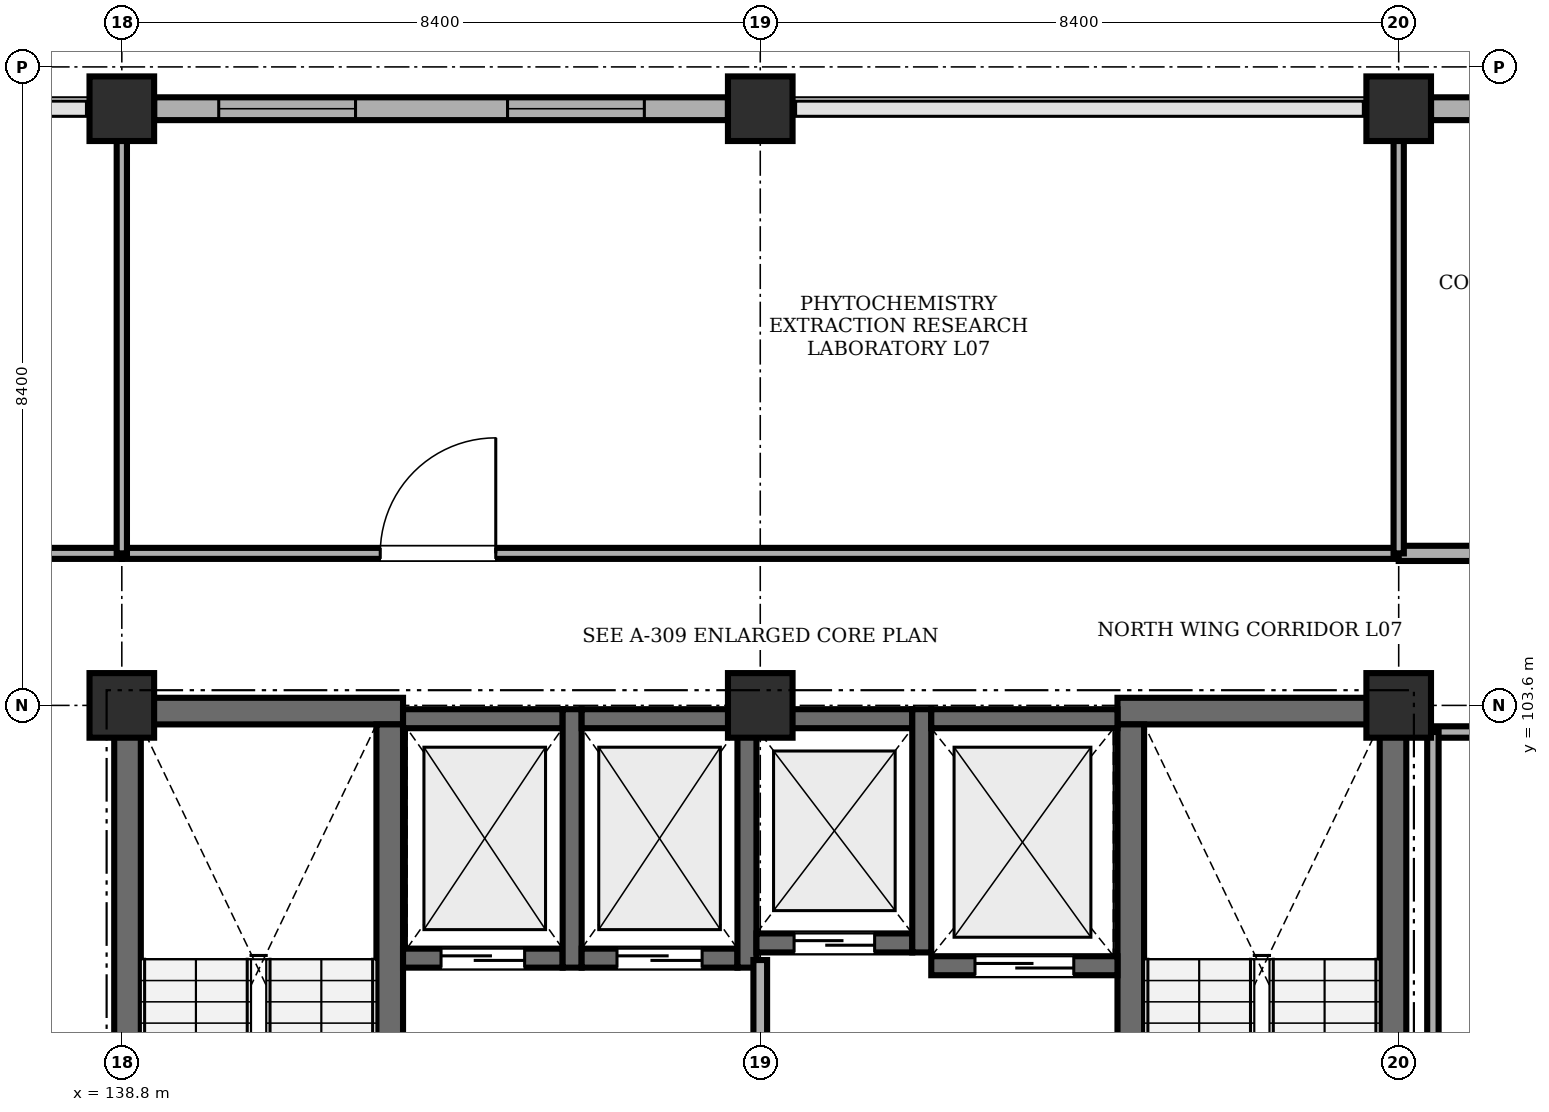
"""IFC4 building model, lengths in metres.
Left out: names, types, materials, properties, quantities, classifications, styles, units other than length and angle.
Written with IfcOpenShell. Run it as: python <this file> out.ifc"""

import sys

from ifc_helpers import new_model, si_unit, direction, frame, frame_2d, origin, origin_2d, place, context, subcontext, project, spatial, rectangle, extrude, element, fill, save


model = new_model("IFC4")
c1 = context("Model", 3, precision=1e-05, world=origin(), true_north=direction((0.0, 1.0)))
c2 = subcontext(c1, "Body", "Model", "MODEL_VIEW")
j1 = project(units=[si_unit("LENGTHUNIT", "METRE"), si_unit("PLANEANGLEUNIT", "RADIAN")], contexts=[c1])
p1 = place(None, origin())
s1 = spatial("IfcSite", under=j1, at=p1, CompositionType="ELEMENT")
p2 = place(p1, origin())
s2 = spatial("IfcBuilding", under=s1, at=p2, CompositionType="ELEMENT")
p3 = place(p2, frame((0.0, 0.0, 27.6)))
s3 = spatial("IfcBuildingStorey", under=s2, at=p3, CompositionType="ELEMENT", Elevation=27.6)
for number, where, z_axis, x_axis in (
    (1, (138.8, 103.6, 0.0), (0.0, 0.0, 1.0), (1.0, 0.0, 0.0)),
    (2, (138.8, 111.45, 0.0), (0.0, 0.0, 1.0), (1.0, 0.0, 0.0)),
    (3, (147.2, 103.6, 0.0), (0.0, 0.0, 1.0), (1.0, 0.0, 0.0)),
    (4, (147.2, 111.45, 0.0), (0.0, 0.0, 1.0), (1.0, 0.0, 0.0)),
    (5, (155.6, 103.6, 0.0), (0.0, 0.0, 1.0), (1.0, 0.0, 0.0)),
    (6, (155.6, 111.45, 0.0), (0.0, 0.0, 1.0), (1.0, 0.0, 0.0)),
):
    element("IfcColumn", number, at=place(p3, frame(where, z_axis=z_axis, x_axis=x_axis)), inside=s3, PredefinedType="COLUMN", context=c2, shape_type="SweptSolid", body=[
        extrude(rectangle(XDim=0.85, YDim=0.85, at=origin_2d()), origin(), (0.0, 0.0, 1.0), 4.02),
    ])
p4 = place(p3, frame((138.7, 103.525, 0.0), z_axis=(0.0, 0.0, 1.0), x_axis=(1.0, 0.0, 0.0)))
e7 = element("IfcWall", 7, at=p4, inside=s3, PredefinedType="SHEAR", context=c2, shape_type="SweptSolid", body=[
    extrude(rectangle(XDim=3.8, YDim=0.35, at=frame_2d((1.9, 0.0))), origin(), (0.0, 0.0, 1.0), 4.02),
])
p5 = place(p3, frame((138.875, 95.45, 0.0), z_axis=(0.0, 0.0, 1.0), x_axis=(0.0, 1.0, 0.0)))
e8 = element("IfcWall", 8, at=p5, inside=s3, PredefinedType="SHEAR", context=c2, shape_type="SweptSolid", body=[
    extrude(rectangle(XDim=7.9, YDim=0.35, at=frame_2d((3.95, 0.0))), origin(), (0.0, 0.0, 1.0), 4.02),
])
p6 = place(p3, frame((142.325, 95.45, 0.0), z_axis=(0.0, 0.0, 1.0), x_axis=(0.0, 1.0, 0.0)))
e9 = element("IfcWall", 9, at=p6, inside=s3, PredefinedType="SHEAR", context=c2, shape_type="SweptSolid", body=[
    extrude(rectangle(XDim=7.9, YDim=0.35, at=frame_2d((3.95, 0.0))), origin(), (0.0, 0.0, 1.0), 4.02),
])
p7 = place(p6, frame((0.22, 0.0, 0.0)))
e10 = element("IfcOpeningElement", 10, at=p7, cuts=e9, PredefinedType="OPENING", context=c2, shape_type="SweptSolid", body=[
    extrude(rectangle(XDim=1.15, YDim=2.15, at=frame_2d((0.575, 1.075))), frame((0.0, 0.185, 0.0), z_axis=(0.0, -1.0, 0.0), x_axis=(1.0, 0.0, 0.0)), (0.0, 0.0, 1.0), 0.37),
])
p8 = place(p3, frame((151.9, 103.525, 0.0), z_axis=(0.0, 0.0, 1.0), x_axis=(1.0, 0.0, 0.0)))
e11 = element("IfcWall", 11, at=p8, inside=s3, PredefinedType="SHEAR", context=c2, shape_type="SweptSolid", body=[
    extrude(rectangle(XDim=3.8, YDim=0.35, at=frame_2d((1.9, 0.0))), origin(), (0.0, 0.0, 1.0), 4.02),
])
p9 = place(p3, frame((152.075, 95.45, 0.0), z_axis=(0.0, 0.0, 1.0), x_axis=(0.0, 1.0, 0.0)))
e12 = element("IfcWall", 12, at=p9, inside=s3, PredefinedType="SHEAR", context=c2, shape_type="SweptSolid", body=[
    extrude(rectangle(XDim=7.9, YDim=0.35, at=frame_2d((3.95, 0.0))), origin(), (0.0, 0.0, 1.0), 4.02),
])
p10 = place(p9, frame((0.35, 0.0, 0.0)))
e13 = element("IfcOpeningElement", 13, at=p10, cuts=e12, PredefinedType="OPENING", context=c2, shape_type="SweptSolid", body=[
    extrude(rectangle(XDim=1.15, YDim=2.15, at=frame_2d((0.575, 1.075))), frame((0.0, 0.185, 0.0), z_axis=(0.0, -1.0, 0.0), x_axis=(1.0, 0.0, 0.0)), (0.0, 0.0, 1.0), 0.37),
])
p11 = place(p3, frame((155.525, 95.45, 0.0), z_axis=(0.0, 0.0, 1.0), x_axis=(0.0, 1.0, 0.0)))
e14 = element("IfcWall", 14, at=p11, inside=s3, PredefinedType="SHEAR", context=c2, shape_type="SweptSolid", body=[
    extrude(rectangle(XDim=7.9, YDim=0.35, at=frame_2d((3.95, 0.0))), origin(), (0.0, 0.0, 1.0), 4.02),
])
p12 = place(p3, frame((142.5, 100.275, 0.0), z_axis=(0.0, 0.0, 1.0), x_axis=(1.0, 0.0, 0.0)))
e15 = element("IfcWall", 15, at=p12, inside=s3, PredefinedType="SHEAR", context=c2, shape_type="SweptSolid", body=[
    extrude(rectangle(XDim=2.1, YDim=0.25, at=frame_2d((1.05, 0.0))), origin(), (0.0, 0.0, 1.0), 4.02),
])
p13 = place(p12, frame((0.5, 0.0, 0.0)))
e16 = element("IfcOpeningElement", 16, at=p13, cuts=e15, PredefinedType="OPENING", context=c2, shape_type="SweptSolid", body=[
    extrude(rectangle(XDim=1.1, YDim=2.15, at=frame_2d((0.55, 1.075))), frame((0.0, 0.135, 0.0), z_axis=(0.0, -1.0, 0.0), x_axis=(1.0, 0.0, 0.0)), (0.0, 0.0, 1.0), 0.27),
])
p14 = place(p3, frame((142.5, 103.425, 0.0), z_axis=(0.0, 0.0, 1.0), x_axis=(1.0, 0.0, 0.0)))
e17 = element("IfcWall", 17, at=p14, inside=s3, PredefinedType="SHEAR", context=c2, shape_type="SweptSolid", body=[
    extrude(rectangle(XDim=2.1, YDim=0.25, at=frame_2d((1.05, 0.0))), origin(), (0.0, 0.0, 1.0), 4.02),
])
p15 = place(p3, frame((144.725, 100.15, 0.0), z_axis=(0.0, 0.0, 1.0), x_axis=(0.0, 1.0, 0.0)))
e18 = element("IfcWall", 18, at=p15, inside=s3, PredefinedType="SHEAR", context=c2, shape_type="SweptSolid", body=[
    extrude(rectangle(XDim=3.4, YDim=0.25, at=frame_2d((1.7, 0.0))), origin(), (0.0, 0.0, 1.0), 4.02),
])
p16 = place(p3, frame((144.85, 100.275, 0.0), z_axis=(0.0, 0.0, 1.0), x_axis=(1.0, 0.0, 0.0)))
e19 = element("IfcWall", 19, at=p16, inside=s3, PredefinedType="SHEAR", context=c2, shape_type="SweptSolid", body=[
    extrude(rectangle(XDim=2.05, YDim=0.25, at=frame_2d((1.025, 0.0))), origin(), (0.0, 0.0, 1.0), 4.02),
])
p17 = place(p16, frame((0.465, 0.0, 0.0)))
e20 = element("IfcOpeningElement", 20, at=p17, cuts=e19, PredefinedType="OPENING", context=c2, shape_type="SweptSolid", body=[
    extrude(rectangle(XDim=1.12, YDim=2.15, at=frame_2d((0.56, 1.075))), frame((0.0, 0.135, 0.0), z_axis=(0.0, -1.0, 0.0), x_axis=(1.0, 0.0, 0.0)), (0.0, 0.0, 1.0), 0.27),
])
p18 = place(p3, frame((144.85, 103.425, 0.0), z_axis=(0.0, 0.0, 1.0), x_axis=(1.0, 0.0, 0.0)))
e21 = element("IfcWall", 21, at=p18, inside=s3, PredefinedType="SHEAR", context=c2, shape_type="SweptSolid", body=[
    extrude(rectangle(XDim=2.05, YDim=0.25, at=frame_2d((1.025, 0.0))), origin(), (0.0, 0.0, 1.0), 4.02),
])
p19 = place(p3, frame((147.025, 100.15, 0.0), z_axis=(0.0, 0.0, 1.0), x_axis=(0.0, 1.0, 0.0)))
e22 = element("IfcWall", 22, at=p19, inside=s3, PredefinedType="SHEAR", context=c2, shape_type="SweptSolid", body=[
    extrude(rectangle(XDim=3.4, YDim=0.25, at=frame_2d((1.7, 0.0))), origin(), (0.0, 0.0, 1.0), 4.02),
])
p20 = place(p3, frame((147.15, 100.475, 0.0), z_axis=(0.0, 0.0, 1.0), x_axis=(1.0, 0.0, 0.0)))
e23 = element("IfcWall", 23, at=p20, inside=s3, PredefinedType="SHEAR", context=c2, shape_type="SweptSolid", body=[
    extrude(rectangle(XDim=2.05, YDim=0.25, at=frame_2d((1.025, 0.0))), origin(), (0.0, 0.0, 1.0), 4.02),
])
p21 = place(p20, frame((0.495, 0.0, 0.0)))
e24 = element("IfcOpeningElement", 24, at=p21, cuts=e23, PredefinedType="OPENING", context=c2, shape_type="SweptSolid", body=[
    extrude(rectangle(XDim=1.06, YDim=2.15, at=frame_2d((0.53, 1.075))), frame((0.0, 0.135, 0.0), z_axis=(0.0, -1.0, 0.0), x_axis=(1.0, 0.0, 0.0)), (0.0, 0.0, 1.0), 0.27),
])
p22 = place(p3, frame((147.15, 103.425, 0.0), z_axis=(0.0, 0.0, 1.0), x_axis=(1.0, 0.0, 0.0)))
e25 = element("IfcWall", 25, at=p22, inside=s3, PredefinedType="SHEAR", context=c2, shape_type="SweptSolid", body=[
    extrude(rectangle(XDim=2.05, YDim=0.25, at=frame_2d((1.025, 0.0))), origin(), (0.0, 0.0, 1.0), 4.02),
])
p23 = place(p3, frame((149.325, 100.35, 0.0), z_axis=(0.0, 0.0, 1.0), x_axis=(0.0, 1.0, 0.0)))
e26 = element("IfcWall", 26, at=p23, inside=s3, PredefinedType="SHEAR", context=c2, shape_type="SweptSolid", body=[
    extrude(rectangle(XDim=3.2, YDim=0.25, at=frame_2d((1.6, 0.0))), origin(), (0.0, 0.0, 1.0), 4.02),
])
p24 = place(p3, frame((149.45, 100.175, 0.0), z_axis=(0.0, 0.0, 1.0), x_axis=(1.0, 0.0, 0.0)))
e27 = element("IfcWall", 27, at=p24, inside=s3, PredefinedType="SHEAR", context=c2, shape_type="SweptSolid", body=[
    extrude(rectangle(XDim=2.45, YDim=0.25, at=frame_2d((1.225, 0.0))), origin(), (0.0, 0.0, 1.0), 4.02),
])
p25 = place(p24, frame((0.575, 0.0, 0.0)))
e28 = element("IfcOpeningElement", 28, at=p25, cuts=e27, PredefinedType="OPENING", context=c2, shape_type="SweptSolid", body=[
    extrude(rectangle(XDim=1.3, YDim=2.25, at=frame_2d((0.65, 1.125))), frame((0.0, 0.135, 0.0), z_axis=(0.0, -1.0, 0.0), x_axis=(1.0, 0.0, 0.0)), (0.0, 0.0, 1.0), 0.27),
])
p26 = place(p3, frame((149.45, 103.425, 0.0), z_axis=(0.0, 0.0, 1.0), x_axis=(1.0, 0.0, 0.0)))
e29 = element("IfcWall", 29, at=p26, inside=s3, PredefinedType="SHEAR", context=c2, shape_type="SweptSolid", body=[
    extrude(rectangle(XDim=2.45, YDim=0.25, at=frame_2d((1.225, 0.0))), origin(), (0.0, 0.0, 1.0), 4.02),
])
p27 = place(p3, frame((139.225, 111.45, 0.0), z_axis=(0.0, 0.0, 1.0), x_axis=(1.0, 0.0, 0.0)))
e30 = element("IfcWall", 30, at=p27, inside=s3, PredefinedType="STANDARD", context=c2, shape_type="SweptSolid", body=[
    extrude(rectangle(XDim=7.55, YDim=0.3, at=frame_2d((3.775, 0.0))), origin(), (0.0, 0.0, 1.0), 3.32),
])
p28 = place(p27, frame((0.85, 0.0, 0.9)))
e31 = element("IfcOpeningElement", 31, at=p28, cuts=e30, PredefinedType="OPENING", context=c2, shape_type="SweptSolid", body=[
    extrude(rectangle(XDim=1.8, YDim=2.1, at=frame_2d((0.9, 1.05))), frame((0.0, 0.16, 0.0), z_axis=(0.0, -1.0, 0.0), x_axis=(1.0, 0.0, 0.0)), (0.0, 0.0, 1.0), 0.32),
])
p29 = place(p27, frame((4.65, 0.0, 0.9)))
e32 = element("IfcOpeningElement", 32, at=p29, cuts=e30, PredefinedType="OPENING", context=c2, shape_type="SweptSolid", body=[
    extrude(rectangle(XDim=1.8, YDim=2.1, at=frame_2d((0.9, 1.05))), frame((0.0, 0.16, 0.0), z_axis=(0.0, -1.0, 0.0), x_axis=(1.0, 0.0, 0.0)), (0.0, 0.0, 1.0), 0.32),
])
p30 = place(p3, frame((156.025, 111.45, 0.0), z_axis=(0.0, 0.0, 1.0), x_axis=(1.0, 0.0, 0.0)))
e33 = element("IfcWall", 33, at=p30, inside=s3, PredefinedType="STANDARD", context=c2, shape_type="SweptSolid", body=[
    extrude(rectangle(XDim=7.0, YDim=0.3, at=frame_2d((3.5, 0.0))), origin(), (0.0, 0.0, 1.0), 3.32),
])
p31 = place(p30, frame((0.85, 0.0, 0.9)))
e34 = element("IfcOpeningElement", 34, at=p31, cuts=e33, PredefinedType="OPENING", context=c2, shape_type="SweptSolid", body=[
    extrude(rectangle(XDim=1.8, YDim=2.1, at=frame_2d((0.9, 1.05))), frame((0.0, 0.16, 0.0), z_axis=(0.0, -1.0, 0.0), x_axis=(1.0, 0.0, 0.0)), (0.0, 0.0, 1.0), 0.32),
])
p32 = place(p30, frame((4.65, 0.0, 0.9)))
e35 = element("IfcOpeningElement", 35, at=p32, cuts=e33, PredefinedType="OPENING", context=c2, shape_type="SweptSolid", body=[
    extrude(rectangle(XDim=1.8, YDim=2.1, at=frame_2d((0.9, 1.05))), frame((0.0, 0.16, 0.0), z_axis=(0.0, -1.0, 0.0), x_axis=(1.0, 0.0, 0.0)), (0.0, 0.0, 1.0), 0.32),
])
p33 = place(p3, frame((147.2, 95.75, 0.0), z_axis=(0.0, 0.0, 1.0), x_axis=(0.0, 1.0, 0.0)))
e36 = element("IfcWall", 36, at=p33, inside=s3, PredefinedType="STANDARD", context=c2, shape_type="SweptSolid", body=[
    extrude(rectangle(XDim=4.5, YDim=0.18, at=frame_2d((2.25, 0.0))), origin(), (0.0, 0.0, 1.0), 3.32),
])
p34 = place(p3, frame((156.05, 103.25, 0.0), z_axis=(0.0, 0.0, 1.0), x_axis=(1.0, 0.0, 0.0)))
e37 = element("IfcWall", 37, at=p34, inside=s3, PredefinedType="PARTITIONING", context=c2, shape_type="SweptSolid", body=[
    extrude(rectangle(XDim=7.15, YDim=0.15, at=frame_2d((3.575, 0.0))), origin(), (0.0, 0.0, 1.0), 4.02),
])
p35 = place(p3, frame((156.05, 94.68, 0.0), z_axis=(0.0, 0.0, 1.0), x_axis=(0.0, 1.0, 0.0)))
e38 = element("IfcWall", 38, at=p35, inside=s3, PredefinedType="PARTITIONING", context=c2, shape_type="SweptSolid", body=[
    extrude(rectangle(XDim=8.57, YDim=0.15, at=frame_2d((4.285, 0.0))), origin(), (0.0, 0.0, 1.0), 4.02),
])
p36 = place(p3, frame((122.15, 105.6, 0.0), z_axis=(0.0, 0.0, 1.0), x_axis=(1.0, 0.0, 0.0)))
e39 = element("IfcWall", 39, at=p36, inside=s3, PredefinedType="PARTITIONING", context=c2, shape_type="SweptSolid", body=[
    extrude(rectangle(XDim=16.65, YDim=0.145, at=frame_2d((8.325, 0.0))), origin(), (0.0, 0.0, 1.0), 4.02),
])
p37 = place(p36, frame((3.75, 0.0, 0.0)))
e40 = element("IfcOpeningElement", 40, at=p37, cuts=e39, PredefinedType="OPENING", context=c2, shape_type="SweptSolid", body=[
    extrude(rectangle(XDim=1.52, YDim=2.22, at=frame_2d((0.76, 1.11))), frame((0.0, 0.083, 0.0), z_axis=(0.0, -1.0, 0.0), x_axis=(1.0, 0.0, 0.0)), (0.0, 0.0, 1.0), 0.165),
])
p38 = place(p3, frame((138.8, 105.6, 0.0), z_axis=(0.0, 0.0, 1.0), x_axis=(1.0, 0.0, 0.0)))
e41 = element("IfcWall", 41, at=p38, inside=s3, PredefinedType="PARTITIONING", context=c2, shape_type="SweptSolid", body=[
    extrude(rectangle(XDim=16.8, YDim=0.145, at=frame_2d((8.4, 0.0))), origin(), (0.0, 0.0, 1.0), 4.02),
])
p39 = place(p38, frame((3.4, 0.0, 0.0)))
e42 = element("IfcOpeningElement", 42, at=p39, cuts=e41, PredefinedType="OPENING", context=c2, shape_type="SweptSolid", body=[
    extrude(rectangle(XDim=1.52, YDim=2.22, at=frame_2d((0.76, 1.11))), frame((0.0, 0.083, 0.0), z_axis=(0.0, -1.0, 0.0), x_axis=(1.0, 0.0, 0.0)), (0.0, 0.0, 1.0), 0.165),
])
p40 = place(p3, frame((138.8, 105.6, 0.0), z_axis=(0.0, 0.0, 1.0), x_axis=(0.0, 1.0, 0.0)))
e43 = element("IfcWall", 43, at=p40, inside=s3, PredefinedType="PARTITIONING", context=c2, shape_type="SweptSolid", body=[
    extrude(rectangle(XDim=5.75, YDim=0.135, at=frame_2d((2.875, 0.0))), origin(), (0.0, 0.0, 1.0), 3.32),
])
p41 = place(p3, frame((155.6, 105.6, 0.0), z_axis=(0.0, 0.0, 1.0), x_axis=(1.0, 0.0, 0.0)))
e44 = element("IfcWall", 44, at=p41, inside=s3, PredefinedType="SOLIDWALL", context=c2, shape_type="SweptSolid", body=[
    extrude(rectangle(XDim=7.75, YDim=0.2, at=frame_2d((3.875, 0.0))), origin(), (0.0, 0.0, 1.0), 4.02),
])
p42 = place(p41, frame((3.4, 0.0, 0.0)))
e45 = element("IfcOpeningElement", 45, at=p42, cuts=e44, PredefinedType="OPENING", context=c2, shape_type="SweptSolid", body=[
    extrude(rectangle(XDim=1.05, YDim=2.15, at=frame_2d((0.525, 1.075))), frame((0.0, 0.11, 0.0), z_axis=(0.0, -1.0, 0.0), x_axis=(1.0, 0.0, 0.0)), (0.0, 0.0, 1.0), 0.22),
])
p43 = place(p3, frame((155.6, 105.6, 0.0), z_axis=(0.0, 0.0, 1.0), x_axis=(0.0, 1.0, 0.0)))
e46 = element("IfcWall", 46, at=p43, inside=s3, PredefinedType="PARTITIONING", context=c2, shape_type="SweptSolid", body=[
    extrude(rectangle(XDim=5.75, YDim=0.135, at=frame_2d((2.875, 0.0))), origin(), (0.0, 0.0, 1.0), 3.32),
])
p44 = place(p28, origin())
e47 = element("IfcWindow", 47, at=p44, inside=s3, PartitioningType="DOUBLE_PANEL_VERTICAL", PredefinedType="WINDOW", context=c2, shape_type="SweptSolid", body=[
    extrude(rectangle(XDim=1.8, YDim=2.1, at=frame_2d((0.9, 1.05))), frame((0.0, 0.03, 0.0), z_axis=(0.0, -1.0, 0.0), x_axis=(1.0, 0.0, 0.0)), (0.0, 0.0, 1.0), 0.06),
])
fill(e31, e47)
p45 = place(p29, origin())
e48 = element("IfcWindow", 48, at=p45, inside=s3, PartitioningType="DOUBLE_PANEL_VERTICAL", PredefinedType="WINDOW", context=c2, shape_type="SweptSolid", body=[
    extrude(rectangle(XDim=1.8, YDim=2.1, at=frame_2d((0.9, 1.05))), frame((0.0, 0.03, 0.0), z_axis=(0.0, -1.0, 0.0), x_axis=(1.0, 0.0, 0.0)), (0.0, 0.0, 1.0), 0.06),
])
fill(e32, e48)
p46 = place(p39, origin())
e49 = element("IfcDoor", 49, at=p46, inside=s3, OperationType="SINGLE_SWING_RIGHT", PredefinedType="DOOR", context=c2, shape_type="SweptSolid", body=[
    extrude(rectangle(XDim=1.52, YDim=2.22, at=frame_2d((0.76, 1.11))), frame((0.0, 0.025, 0.0), z_axis=(0.0, -1.0, 0.0), x_axis=(1.0, 0.0, 0.0)), (0.0, 0.0, 1.0), 0.05),
])
fill(e42, e49)
p47 = place(p13, origin())
e50 = element("IfcDoor", 50, at=p47, inside=s3, OperationType="SLIDING_TO_LEFT", PredefinedType="DOOR", context=c2, shape_type="SweptSolid", body=[
    extrude(rectangle(XDim=1.1, YDim=2.15, at=frame_2d((0.55, 1.075))), frame((0.0, 0.025, 0.0), z_axis=(0.0, -1.0, 0.0), x_axis=(1.0, 0.0, 0.0)), (0.0, 0.0, 1.0), 0.05),
])
fill(e16, e50)
p48 = place(p17, origin())
e51 = element("IfcDoor", 51, at=p48, inside=s3, OperationType="SLIDING_TO_LEFT", PredefinedType="DOOR", context=c2, shape_type="SweptSolid", body=[
    extrude(rectangle(XDim=1.12, YDim=2.15, at=frame_2d((0.56, 1.075))), frame((0.0, 0.025, 0.0), z_axis=(0.0, -1.0, 0.0), x_axis=(1.0, 0.0, 0.0)), (0.0, 0.0, 1.0), 0.05),
])
fill(e20, e51)
p49 = place(p21, origin())
e52 = element("IfcDoor", 52, at=p49, inside=s3, OperationType="SLIDING_TO_LEFT", PredefinedType="DOOR", context=c2, shape_type="SweptSolid", body=[
    extrude(rectangle(XDim=1.06, YDim=2.15, at=frame_2d((0.53, 1.075))), frame((0.0, 0.025, 0.0), z_axis=(0.0, -1.0, 0.0), x_axis=(1.0, 0.0, 0.0)), (0.0, 0.0, 1.0), 0.05),
])
fill(e24, e52)
p50 = place(p25, origin())
e53 = element("IfcDoor", 53, at=p50, inside=s3, OperationType="SLIDING_TO_LEFT", PredefinedType="DOOR", context=c2, shape_type="SweptSolid", body=[
    extrude(rectangle(XDim=1.3, YDim=2.25, at=frame_2d((0.65, 1.125))), frame((0.0, 0.025, 0.0), z_axis=(0.0, -1.0, 0.0), x_axis=(1.0, 0.0, 0.0)), (0.0, 0.0, 1.0), 0.05),
])
fill(e28, e53)
save(model, sys.argv[1])
